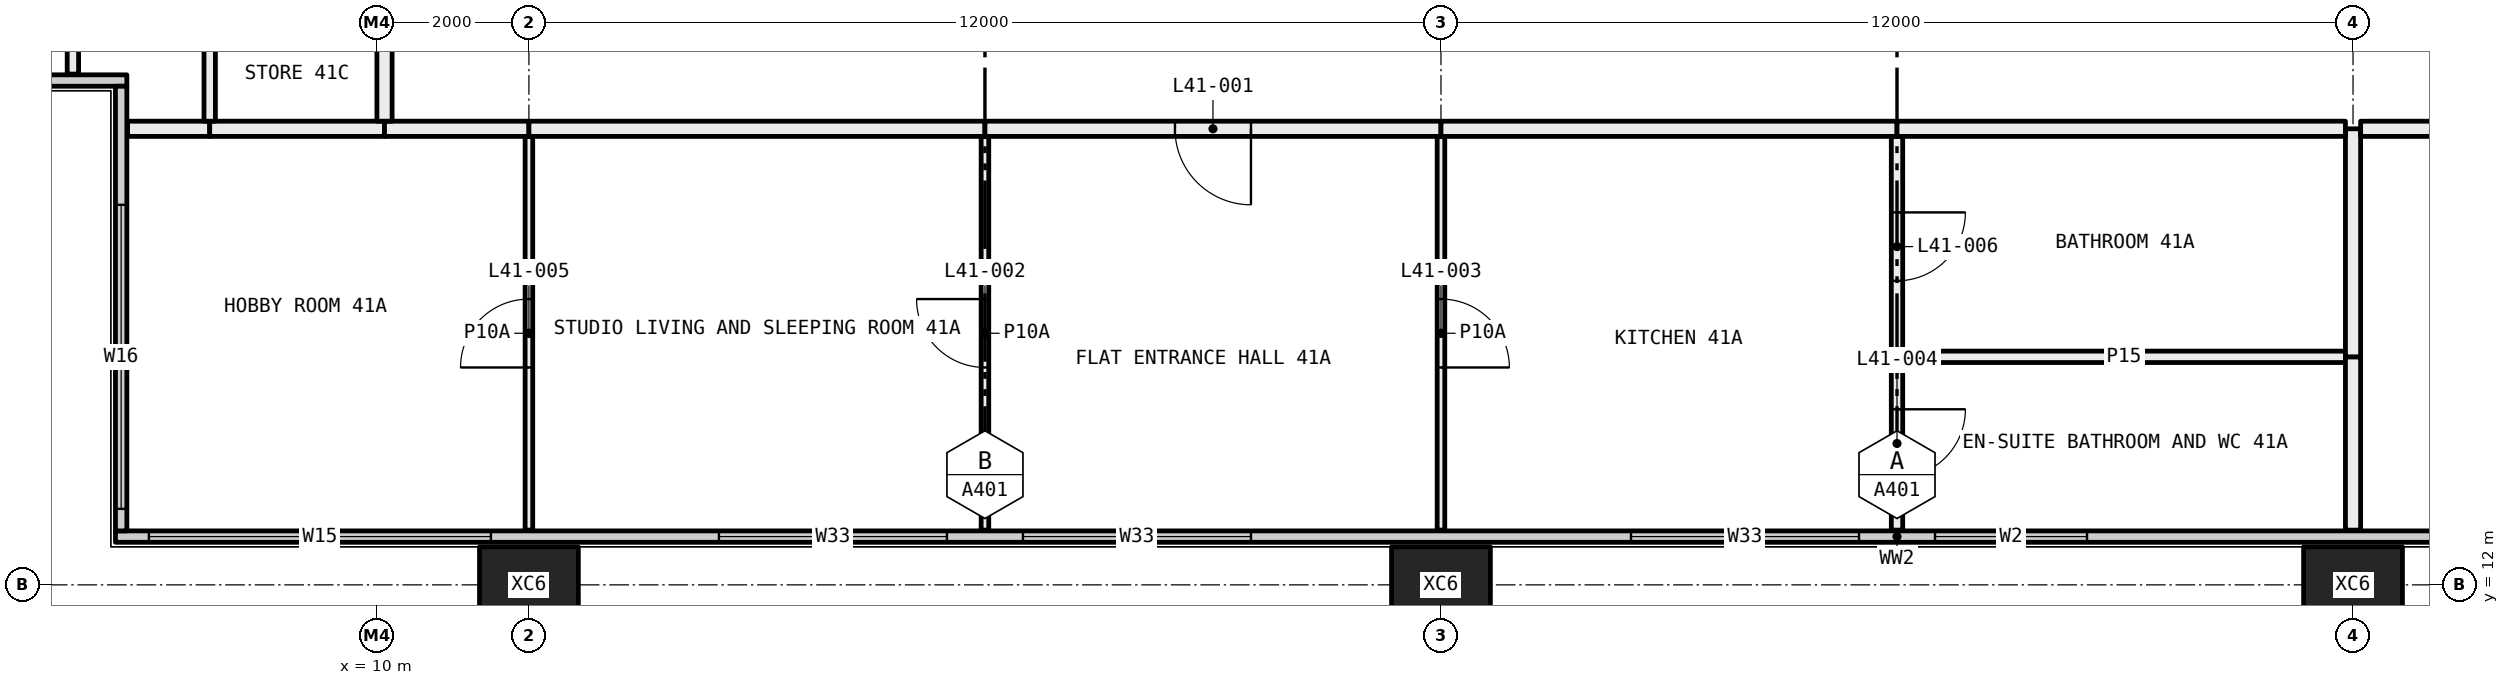
"""IFC4 building model, lengths in metres.
Left out: names, types, materials, properties, quantities, classifications, styles, units other than length and angle.
Written with IfcOpenShell. Run it as: python <this file> out.ifc"""

import sys

from ifc_helpers import new_model, si_unit, direction, frame, frame_2d, origin, origin_2d, place, context, subcontext, project, spatial, rectangle, hollow_rectangle, extrude, element, fill, save


model = new_model("IFC4")
c1 = context("Model", 3, precision=1e-05, world=origin(), true_north=direction((0.0, 1.0)))
c2 = subcontext(c1, "Body", "Model", "MODEL_VIEW")
j1 = project(units=[si_unit("LENGTHUNIT", "METRE"), si_unit("PLANEANGLEUNIT", "RADIAN")], contexts=[c1])
p1 = place(None, origin())
s1 = spatial("IfcSite", under=j1, at=p1, CompositionType="ELEMENT")
p2 = place(p1, origin())
s2 = spatial("IfcBuilding", under=s1, at=p2, CompositionType="ELEMENT")
p3 = place(p2, frame((0.0, 0.0, 158.25)))
s3 = spatial("IfcBuildingStorey", under=s2, at=p3, CompositionType="ELEMENT", Elevation=158.25)
for number, where, z_axis, x_axis in (
    (1, (12.0, 12.0, -0.4), (0.0, 0.0, 1.0), (1.0, 0.0, 0.0)),
    (2, (24.0, 12.0, -0.4), (0.0, 0.0, 1.0), (1.0, 0.0, 0.0)),
    (3, (36.0, 12.0, -0.4), (0.0, 0.0, 1.0), (1.0, 0.0, 0.0)),
):
    element("IfcColumn", number, at=place(p3, frame(where, z_axis=z_axis, x_axis=x_axis)), inside=s3, PredefinedType="COLUMN", context=c2, shape_type="SweptSolid", body=[
        extrude(hollow_rectangle(XDim=1.3, YDim=1.0, WallThickness=0.05, at=origin_2d()), origin(), (0.0, 0.0, 1.0), 3.45),
    ])
p4 = place(p3, frame((6.56, 12.635, 0.0), z_axis=(0.0, 0.0, 1.0), x_axis=(1.0, 0.0, 0.0)))
e4 = element("IfcWall", 4, at=p4, inside=s3, PredefinedType="ELEMENTEDWALL", context=c2, shape_type="SweptSolid", body=[
    extrude(rectangle(XDim=46.88, YDim=0.15, at=frame_2d((23.44, 0.0))), origin(), (0.0, 0.0, 1.0), 3.05),
])
p5 = place(p4, frame((0.44, 0.0, 0.45)))
e5 = element("IfcOpeningElement", 5, at=p5, cuts=e4, PredefinedType="OPENING", context=c2, shape_type="SweptSolid", body=[
    extrude(rectangle(XDim=4.5, YDim=2.55, at=frame_2d((2.25, 1.275))), frame((0.0, 0.085, 0.0), z_axis=(0.0, -1.0, 0.0), x_axis=(1.0, 0.0, 0.0)), (0.0, 0.0, 1.0), 0.17),
])
p6 = place(p4, frame((7.94, 0.0, 0.45)))
e6 = element("IfcOpeningElement", 6, at=p6, cuts=e4, PredefinedType="OPENING", context=c2, shape_type="SweptSolid", body=[
    extrude(rectangle(XDim=3.0, YDim=2.55, at=frame_2d((1.5, 1.275))), frame((0.0, 0.085, 0.0), z_axis=(0.0, -1.0, 0.0), x_axis=(1.0, 0.0, 0.0)), (0.0, 0.0, 1.0), 0.17),
])
p7 = place(p4, frame((11.94, 0.0, 0.45)))
e7 = element("IfcOpeningElement", 7, at=p7, cuts=e4, PredefinedType="OPENING", context=c2, shape_type="SweptSolid", body=[
    extrude(rectangle(XDim=3.0, YDim=2.55, at=frame_2d((1.5, 1.275))), frame((0.0, 0.085, 0.0), z_axis=(0.0, -1.0, 0.0), x_axis=(1.0, 0.0, 0.0)), (0.0, 0.0, 1.0), 0.17),
])
p8 = place(p4, frame((19.94, 0.0, 0.45)))
e8 = element("IfcOpeningElement", 8, at=p8, cuts=e4, PredefinedType="OPENING", context=c2, shape_type="SweptSolid", body=[
    extrude(rectangle(XDim=3.0, YDim=2.55, at=frame_2d((1.5, 1.275))), frame((0.0, 0.085, 0.0), z_axis=(0.0, -1.0, 0.0), x_axis=(1.0, 0.0, 0.0)), (0.0, 0.0, 1.0), 0.17),
])
p9 = place(p4, frame((23.94, 0.0, 0.45)))
e9 = element("IfcOpeningElement", 9, at=p9, cuts=e4, PredefinedType="OPENING", context=c2, shape_type="SweptSolid", body=[
    extrude(rectangle(XDim=2.0, YDim=2.55, at=frame_2d((1.0, 1.275))), frame((0.0, 0.085, 0.0), z_axis=(0.0, -1.0, 0.0), x_axis=(1.0, 0.0, 0.0)), (0.0, 0.0, 1.0), 0.17),
])
p10 = place(p4, frame((31.94, 0.0, 0.45)))
e10 = element("IfcOpeningElement", 10, at=p10, cuts=e4, PredefinedType="OPENING", context=c2, shape_type="SweptSolid", body=[
    extrude(rectangle(XDim=3.0, YDim=2.55, at=frame_2d((1.5, 1.275))), frame((0.0, 0.085, 0.0), z_axis=(0.0, -1.0, 0.0), x_axis=(1.0, 0.0, 0.0)), (0.0, 0.0, 1.0), 0.17),
])
p11 = place(p4, frame((35.94, 0.0, 0.45)))
e11 = element("IfcOpeningElement", 11, at=p11, cuts=e4, PredefinedType="OPENING", context=c2, shape_type="SweptSolid", body=[
    extrude(rectangle(XDim=3.0, YDim=2.55, at=frame_2d((1.5, 1.275))), frame((0.0, 0.085, 0.0), z_axis=(0.0, -1.0, 0.0), x_axis=(1.0, 0.0, 0.0)), (0.0, 0.0, 1.0), 0.17),
])
p12 = place(p4, frame((41.94, 0.0, 0.45)))
e12 = element("IfcOpeningElement", 12, at=p12, cuts=e4, PredefinedType="OPENING", context=c2, shape_type="SweptSolid", body=[
    extrude(rectangle(XDim=4.5, YDim=2.55, at=frame_2d((2.25, 1.275))), frame((0.0, 0.085, 0.0), z_axis=(0.0, -1.0, 0.0), x_axis=(1.0, 0.0, 0.0)), (0.0, 0.0, 1.0), 0.17),
])
p13 = place(p3, frame((0.56, 18.635, 0.0), z_axis=(0.0, 0.0, 1.0), x_axis=(1.0, 0.0, 0.0)))
e13 = element("IfcWall", 13, at=p13, inside=s3, PredefinedType="ELEMENTEDWALL", context=c2, shape_type="SweptSolid", body=[
    extrude(rectangle(XDim=6.15, YDim=0.15, at=frame_2d((3.075, 0.0))), origin(), (0.0, 0.0, 1.0), 3.05),
])
p14 = place(p13, frame((0.44, 0.0, 0.45)))
e14 = element("IfcOpeningElement", 14, at=p14, cuts=e13, PredefinedType="OPENING", context=c2, shape_type="SweptSolid", body=[
    extrude(rectangle(XDim=4.0, YDim=2.55, at=frame_2d((2.0, 1.275))), frame((0.0, 0.085, 0.0), z_axis=(0.0, -1.0, 0.0), x_axis=(1.0, 0.0, 0.0)), (0.0, 0.0, 1.0), 0.17),
])
p15 = place(p3, frame((6.635, 12.71, 0.0), z_axis=(0.0, 0.0, 1.0), x_axis=(0.0, 1.0, 0.0)))
e15 = element("IfcWall", 15, at=p15, inside=s3, PredefinedType="ELEMENTEDWALL", context=c2, shape_type="SweptSolid", body=[
    extrude(rectangle(XDim=5.85, YDim=0.15, at=frame_2d((2.925, 0.0))), origin(), (0.0, 0.0, 1.0), 3.05),
])
p16 = place(p15, frame((0.29, 0.0, 0.45)))
e16 = element("IfcOpeningElement", 16, at=p16, cuts=e15, PredefinedType="OPENING", context=c2, shape_type="SweptSolid", body=[
    extrude(rectangle(XDim=4.0, YDim=2.55, at=frame_2d((2.0, 1.275))), frame((0.0, 0.085, 0.0), z_axis=(0.0, -1.0, 0.0), x_axis=(1.0, 0.0, 0.0)), (0.0, 0.0, 1.0), 0.17),
])
p17 = place(p3, frame((12.0, 12.72, 0.0), z_axis=(0.0, 0.0, 1.0), x_axis=(0.0, 1.0, 0.0)))
e17 = element("IfcWall", 17, at=p17, inside=s3, PredefinedType="PARTITIONING", context=c2, shape_type="SweptSolid", body=[
    extrude(rectangle(XDim=5.18, YDim=0.1, at=frame_2d((2.59, 0.0))), origin(), (0.0, 0.0, 1.0), 3.05),
])
p18 = place(p17, frame((2.14, 0.0, 0.0)))
e18 = element("IfcOpeningElement", 18, at=p18, cuts=e17, PredefinedType="OPENING", context=c2, shape_type="SweptSolid", body=[
    extrude(rectangle(XDim=0.9, YDim=2.1, at=frame_2d((0.45, 1.05))), frame((0.0, 0.06, 0.0), z_axis=(0.0, -1.0, 0.0), x_axis=(1.0, 0.0, 0.0)), (0.0, 0.0, 1.0), 0.12),
])
p19 = place(p3, frame((7.8, 18.0, 0.0), z_axis=(0.0, 0.0, 1.0), x_axis=(-1.0, 0.0, 0.0)))
e19 = element("IfcWall", 19, at=p19, inside=s3, PredefinedType="PARTITIONING", context=c2, shape_type="SweptSolid", body=[
    extrude(rectangle(XDim=1.08, YDim=0.2, at=frame_2d((0.54, 0.0))), origin(), (0.0, 0.0, 1.0), 3.05),
])
p20 = place(p3, frame((10.1, 18.0, 0.0), z_axis=(0.0, 0.0, 1.0), x_axis=(-1.0, 0.0, 0.0)))
e20 = element("IfcWall", 20, at=p20, inside=s3, PredefinedType="PARTITIONING", context=c2, shape_type="SweptSolid", body=[
    extrude(rectangle(XDim=2.3, YDim=0.2, at=frame_2d((1.15, 0.0))), origin(), (0.0, 0.0, 1.0), 3.05),
])
p21 = place(p3, frame((12.0, 18.0, 0.0), z_axis=(0.0, 0.0, 1.0), x_axis=(-1.0, 0.0, 0.0)))
e21 = element("IfcWall", 21, at=p21, inside=s3, PredefinedType="PARTITIONING", context=c2, shape_type="SweptSolid", body=[
    extrude(rectangle(XDim=1.9, YDim=0.2, at=frame_2d((0.95, 0.0))), origin(), (0.0, 0.0, 1.0), 3.05),
])
p22 = place(p3, frame((18.0, 12.72, 0.0), z_axis=(0.0, 0.0, 1.0), x_axis=(0.0, 1.0, 0.0)))
e22 = element("IfcWall", 22, at=p22, inside=s3, PredefinedType="PARTITIONING", context=c2, shape_type="SweptSolid", body=[
    extrude(rectangle(XDim=5.18, YDim=0.1, at=frame_2d((2.59, 0.0))), origin(), (0.0, 0.0, 1.0), 3.05),
])
p23 = place(p22, frame((2.14, 0.0, 0.0)))
e23 = element("IfcOpeningElement", 23, at=p23, cuts=e22, PredefinedType="OPENING", context=c2, shape_type="SweptSolid", body=[
    extrude(rectangle(XDim=0.9, YDim=2.1, at=frame_2d((0.45, 1.05))), frame((0.0, 0.06, 0.0), z_axis=(0.0, -1.0, 0.0), x_axis=(1.0, 0.0, 0.0)), (0.0, 0.0, 1.0), 0.12),
])
p24 = place(p3, frame((18.0, 18.0, 0.0), z_axis=(0.0, 0.0, 1.0), x_axis=(-1.0, 0.0, 0.0)))
e24 = element("IfcWall", 24, at=p24, inside=s3, PredefinedType="PARTITIONING", context=c2, shape_type="SweptSolid", body=[
    extrude(rectangle(XDim=6.0, YDim=0.2, at=frame_2d((3.0, 0.0))), origin(), (0.0, 0.0, 1.0), 3.05),
])
p25 = place(p3, frame((24.0, 12.72, 0.0), z_axis=(0.0, 0.0, 1.0), x_axis=(0.0, 1.0, 0.0)))
e25 = element("IfcWall", 25, at=p25, inside=s3, PredefinedType="PARTITIONING", context=c2, shape_type="SweptSolid", body=[
    extrude(rectangle(XDim=5.18, YDim=0.1, at=frame_2d((2.59, 0.0))), origin(), (0.0, 0.0, 1.0), 3.05),
])
p26 = place(p25, frame((2.14, 0.0, 0.0)))
e26 = element("IfcOpeningElement", 26, at=p26, cuts=e25, PredefinedType="OPENING", context=c2, shape_type="SweptSolid", body=[
    extrude(rectangle(XDim=0.9, YDim=2.1, at=frame_2d((0.45, 1.05))), frame((0.0, 0.06, 0.0), z_axis=(0.0, -1.0, 0.0), x_axis=(1.0, 0.0, 0.0)), (0.0, 0.0, 1.0), 0.12),
])
p27 = place(p3, frame((24.0, 18.0, 0.0), z_axis=(0.0, 0.0, 1.0), x_axis=(-1.0, 0.0, 0.0)))
e27 = element("IfcWall", 27, at=p27, inside=s3, PredefinedType="PARTITIONING", context=c2, shape_type="SweptSolid", body=[
    extrude(rectangle(XDim=6.0, YDim=0.2, at=frame_2d((3.0, 0.0))), origin(), (0.0, 0.0, 1.0), 3.05),
])
p28 = place(p27, frame((2.5, 0.0, 0.0)))
e28 = element("IfcOpeningElement", 28, at=p28, cuts=e27, PredefinedType="OPENING", context=c2, shape_type="SweptSolid", body=[
    extrude(rectangle(XDim=1.0, YDim=2.1, at=frame_2d((0.5, 1.05))), frame((0.0, 0.11, 0.0), z_axis=(0.0, -1.0, 0.0), x_axis=(1.0, 0.0, 0.0)), (0.0, 0.0, 1.0), 0.22),
])
p29 = place(p3, frame((30.0, 12.72, 0.0), z_axis=(0.0, 0.0, 1.0), x_axis=(0.0, 1.0, 0.0)))
e29 = element("IfcWall", 29, at=p29, inside=s3, PredefinedType="PARTITIONING", context=c2, shape_type="SweptSolid", body=[
    extrude(rectangle(XDim=2.28, YDim=0.15, at=frame_2d((1.14, 0.0))), origin(), (0.0, 0.0, 1.0), 3.05),
])
p30 = place(p29, frame((0.69, 0.0, 0.0)))
e30 = element("IfcOpeningElement", 30, at=p30, cuts=e29, PredefinedType="OPENING", context=c2, shape_type="SweptSolid", body=[
    extrude(rectangle(XDim=0.9, YDim=2.1, at=frame_2d((0.45, 1.05))), frame((0.0, 0.085, 0.0), z_axis=(0.0, -1.0, 0.0), x_axis=(1.0, 0.0, 0.0)), (0.0, 0.0, 1.0), 0.17),
])
p31 = place(p3, frame((30.0, 15.0, 0.0), z_axis=(0.0, 0.0, 1.0), x_axis=(0.0, 1.0, 0.0)))
e31 = element("IfcWall", 31, at=p31, inside=s3, PredefinedType="PARTITIONING", context=c2, shape_type="SweptSolid", body=[
    extrude(rectangle(XDim=2.9, YDim=0.15, at=frame_2d((1.45, 0.0))), origin(), (0.0, 0.0, 1.0), 3.05),
])
p32 = place(p31, frame((1.0, 0.0, 0.0)))
e32 = element("IfcOpeningElement", 32, at=p32, cuts=e31, PredefinedType="OPENING", context=c2, shape_type="SweptSolid", body=[
    extrude(rectangle(XDim=0.9, YDim=2.1, at=frame_2d((0.45, 1.05))), frame((0.0, 0.085, 0.0), z_axis=(0.0, -1.0, 0.0), x_axis=(1.0, 0.0, 0.0)), (0.0, 0.0, 1.0), 0.17),
])
p33 = place(p3, frame((30.0, 18.0, 0.0), z_axis=(0.0, 0.0, 1.0), x_axis=(-1.0, 0.0, 0.0)))
e33 = element("IfcWall", 33, at=p33, inside=s3, PredefinedType="PARTITIONING", context=c2, shape_type="SweptSolid", body=[
    extrude(rectangle(XDim=6.0, YDim=0.2, at=frame_2d((3.0, 0.0))), origin(), (0.0, 0.0, 1.0), 3.05),
])
p34 = place(p3, frame((35.9, 15.0, 0.0), z_axis=(0.0, 0.0, 1.0), x_axis=(-1.0, 0.0, 0.0)))
e34 = element("IfcWall", 34, at=p34, inside=s3, PredefinedType="PARTITIONING", context=c2, shape_type="SweptSolid", body=[
    extrude(rectangle(XDim=5.825, YDim=0.15, at=frame_2d((2.913, 0.0))), origin(), (0.0, 0.0, 1.0), 3.05),
])
p35 = place(p3, frame((36.0, 12.72, 0.0), z_axis=(0.0, 0.0, 1.0), x_axis=(0.0, 1.0, 0.0)))
e35 = element("IfcWall", 35, at=p35, inside=s3, PredefinedType="PARTITIONING", context=c2, shape_type="SweptSolid", body=[
    extrude(rectangle(XDim=2.28, YDim=0.2, at=frame_2d((1.14, 0.0))), origin(), (0.0, 0.0, 1.0), 2.45),
])
p36 = place(p3, frame((36.0, 15.0, 0.0), z_axis=(0.0, 0.0, 1.0), x_axis=(0.0, 1.0, 0.0)))
e36 = element("IfcWall", 36, at=p36, inside=s3, PredefinedType="PARTITIONING", context=c2, shape_type="SweptSolid", body=[
    extrude(rectangle(XDim=3.0, YDim=0.2, at=frame_2d((1.5, 0.0))), origin(), (0.0, 0.0, 1.0), 2.45),
])
p37 = place(p3, frame((35.9, 18.0, 0.0), z_axis=(0.0, 0.0, 1.0), x_axis=(-1.0, 0.0, 0.0)))
e37 = element("IfcWall", 37, at=p37, inside=s3, PredefinedType="PARTITIONING", context=c2, shape_type="SweptSolid", body=[
    extrude(rectangle(XDim=5.9, YDim=0.2, at=frame_2d((2.95, 0.0))), origin(), (0.0, 0.0, 1.0), 3.05),
])
p38 = place(p3, frame((6.0, 18.72, 0.0), z_axis=(0.0, 0.0, 1.0), x_axis=(0.0, 1.0, 0.0)))
e38 = element("IfcWall", 38, at=p38, inside=s3, PredefinedType="PARTITIONING", context=c2, shape_type="SweptSolid", body=[
    extrude(rectangle(XDim=2.28, YDim=0.15, at=frame_2d((1.14, 0.0))), origin(), (0.0, 0.0, 1.0), 3.05),
])
p39 = place(p3, frame((7.8, 18.1, 0.0), z_axis=(0.0, 0.0, 1.0), x_axis=(0.0, 1.0, 0.0)))
e39 = element("IfcWall", 39, at=p39, inside=s3, PredefinedType="PARTITIONING", context=c2, shape_type="SweptSolid", body=[
    extrude(rectangle(XDim=2.9, YDim=0.15, at=frame_2d((1.45, 0.0))), origin(), (0.0, 0.0, 1.0), 3.05),
])
p40 = place(p3, frame((10.1, 18.1, 0.0), z_axis=(0.0, 0.0, 1.0), x_axis=(0.0, 1.0, 0.0)))
e40 = element("IfcWall", 40, at=p40, inside=s3, PredefinedType="PARTITIONING", context=c2, shape_type="SweptSolid", body=[
    extrude(rectangle(XDim=2.9, YDim=0.2, at=frame_2d((1.45, 0.0))), origin(), (0.0, 0.0, 1.0), 3.05),
])
p41 = place(p3, frame((53.28, 18.0, 0.0), z_axis=(0.0, 0.0, 1.0), x_axis=(-1.0, 0.0, 0.0)))
e41 = element("IfcWall", 41, at=p41, inside=s3, PredefinedType="PARTITIONING", context=c2, shape_type="SweptSolid", body=[
    extrude(rectangle(XDim=17.18, YDim=0.2, at=frame_2d((8.59, 0.0))), origin(), (0.0, 0.0, 1.0), 3.05),
])
p42 = place(p41, frame((7.79, 0.0, 0.0)))
e42 = element("IfcOpeningElement", 42, at=p42, cuts=e41, PredefinedType="OPENING", context=c2, shape_type="SweptSolid", body=[
    extrude(rectangle(XDim=1.6, YDim=2.1, at=frame_2d((0.8, 1.05))), frame((0.0, 0.11, 0.0), z_axis=(0.0, -1.0, 0.0), x_axis=(1.0, 0.0, 0.0)), (0.0, 0.0, 1.0), 0.22),
])
p43 = place(p5, origin())
e43 = element("IfcWindow", 43, at=p43, inside=s3, PartitioningType="SINGLE_PANEL", PredefinedType="WINDOW", context=c2, shape_type="SweptSolid", body=[
    extrude(rectangle(XDim=4.5, YDim=2.55, at=frame_2d((2.25, 1.275))), frame((0.0, 0.03, 0.0), z_axis=(0.0, -1.0, 0.0), x_axis=(1.0, 0.0, 0.0)), (0.0, 0.0, 1.0), 0.06),
])
fill(e5, e43)
p44 = place(p6, origin())
e44 = element("IfcWindow", 44, at=p44, inside=s3, PartitioningType="SINGLE_PANEL", PredefinedType="WINDOW", context=c2, shape_type="SweptSolid", body=[
    extrude(rectangle(XDim=3.0, YDim=2.55, at=frame_2d((1.5, 1.275))), frame((0.0, 0.03, 0.0), z_axis=(0.0, -1.0, 0.0), x_axis=(1.0, 0.0, 0.0)), (0.0, 0.0, 1.0), 0.06),
])
fill(e6, e44)
p45 = place(p7, origin())
e45 = element("IfcWindow", 45, at=p45, inside=s3, PartitioningType="SINGLE_PANEL", PredefinedType="WINDOW", context=c2, shape_type="SweptSolid", body=[
    extrude(rectangle(XDim=3.0, YDim=2.55, at=frame_2d((1.5, 1.275))), frame((0.0, 0.03, 0.0), z_axis=(0.0, -1.0, 0.0), x_axis=(1.0, 0.0, 0.0)), (0.0, 0.0, 1.0), 0.06),
])
fill(e7, e45)
p46 = place(p8, origin())
e46 = element("IfcWindow", 46, at=p46, inside=s3, PartitioningType="SINGLE_PANEL", PredefinedType="WINDOW", context=c2, shape_type="SweptSolid", body=[
    extrude(rectangle(XDim=3.0, YDim=2.55, at=frame_2d((1.5, 1.275))), frame((0.0, 0.03, 0.0), z_axis=(0.0, -1.0, 0.0), x_axis=(1.0, 0.0, 0.0)), (0.0, 0.0, 1.0), 0.06),
])
fill(e8, e46)
p47 = place(p9, origin())
e47 = element("IfcWindow", 47, at=p47, inside=s3, PartitioningType="SINGLE_PANEL", PredefinedType="WINDOW", context=c2, shape_type="SweptSolid", body=[
    extrude(rectangle(XDim=2.0, YDim=2.55, at=frame_2d((1.0, 1.275))), frame((0.0, 0.03, 0.0), z_axis=(0.0, -1.0, 0.0), x_axis=(1.0, 0.0, 0.0)), (0.0, 0.0, 1.0), 0.06),
])
fill(e9, e47)
p48 = place(p16, origin())
e48 = element("IfcWindow", 48, at=p48, inside=s3, PartitioningType="SINGLE_PANEL", PredefinedType="WINDOW", context=c2, shape_type="SweptSolid", body=[
    extrude(rectangle(XDim=4.0, YDim=2.55, at=frame_2d((2.0, 1.275))), frame((0.0, 0.03, 0.0), z_axis=(0.0, -1.0, 0.0), x_axis=(1.0, 0.0, 0.0)), (0.0, 0.0, 1.0), 0.06),
])
fill(e16, e48)
p49 = place(p28, origin())
e49 = element("IfcDoor", 49, at=p49, inside=s3, OperationType="SINGLE_SWING_RIGHT", PredefinedType="DOOR", context=c2, shape_type="SweptSolid", body=[
    extrude(rectangle(XDim=1.0, YDim=2.1, at=frame_2d((0.5, 1.05))), frame((0.0, 0.025, 0.0), z_axis=(0.0, -1.0, 0.0), x_axis=(1.0, 0.0, 0.0)), (0.0, 0.0, 1.0), 0.05),
])
fill(e28, e49)
p50 = place(p23, origin())
e50 = element("IfcDoor", 50, at=p50, inside=s3, OperationType="SINGLE_SWING_LEFT", PredefinedType="DOOR", context=c2, shape_type="SweptSolid", body=[
    extrude(rectangle(XDim=0.9, YDim=2.1, at=frame_2d((0.45, 1.05))), frame((0.0, 0.025, 0.0), z_axis=(0.0, -1.0, 0.0), x_axis=(1.0, 0.0, 0.0)), (0.0, 0.0, 1.0), 0.05),
])
fill(e23, e50)
p51 = place(p26, frame((0.9, 0.0, 0.0), x_axis=(-1.0, 0.0, 0.0)))
e51 = element("IfcDoor", 51, at=p51, inside=s3, OperationType="SINGLE_SWING_LEFT", PredefinedType="DOOR", context=c2, shape_type="SweptSolid", body=[
    extrude(rectangle(XDim=0.9, YDim=2.1, at=frame_2d((0.45, 1.05))), frame((0.0, 0.025, 0.0), z_axis=(0.0, -1.0, 0.0), x_axis=(1.0, 0.0, 0.0)), (0.0, 0.0, 1.0), 0.05),
])
fill(e26, e51)
p52 = place(p30, frame((0.9, 0.0, 0.0), x_axis=(-1.0, 0.0, 0.0)))
e52 = element("IfcDoor", 52, at=p52, inside=s3, OperationType="SINGLE_SWING_RIGHT", PredefinedType="DOOR", context=c2, shape_type="SweptSolid", body=[
    extrude(rectangle(XDim=0.9, YDim=2.1, at=frame_2d((0.45, 1.05))), frame((0.0, 0.025, 0.0), z_axis=(0.0, -1.0, 0.0), x_axis=(1.0, 0.0, 0.0)), (0.0, 0.0, 1.0), 0.05),
])
fill(e30, e52)
p53 = place(p18, origin())
e53 = element("IfcDoor", 53, at=p53, inside=s3, OperationType="SINGLE_SWING_RIGHT", PredefinedType="DOOR", context=c2, shape_type="SweptSolid", body=[
    extrude(rectangle(XDim=0.9, YDim=2.1, at=frame_2d((0.45, 1.05))), frame((0.0, 0.025, 0.0), z_axis=(0.0, -1.0, 0.0), x_axis=(1.0, 0.0, 0.0)), (0.0, 0.0, 1.0), 0.05),
])
fill(e18, e53)
p54 = place(p32, frame((0.9, 0.0, 0.0), x_axis=(-1.0, 0.0, 0.0)))
e54 = element("IfcDoor", 54, at=p54, inside=s3, OperationType="SINGLE_SWING_RIGHT", PredefinedType="DOOR", context=c2, shape_type="SweptSolid", body=[
    extrude(rectangle(XDim=0.9, YDim=2.1, at=frame_2d((0.45, 1.05))), frame((0.0, 0.025, 0.0), z_axis=(0.0, -1.0, 0.0), x_axis=(1.0, 0.0, 0.0)), (0.0, 0.0, 1.0), 0.05),
])
fill(e32, e54)
save(model, sys.argv[1])
